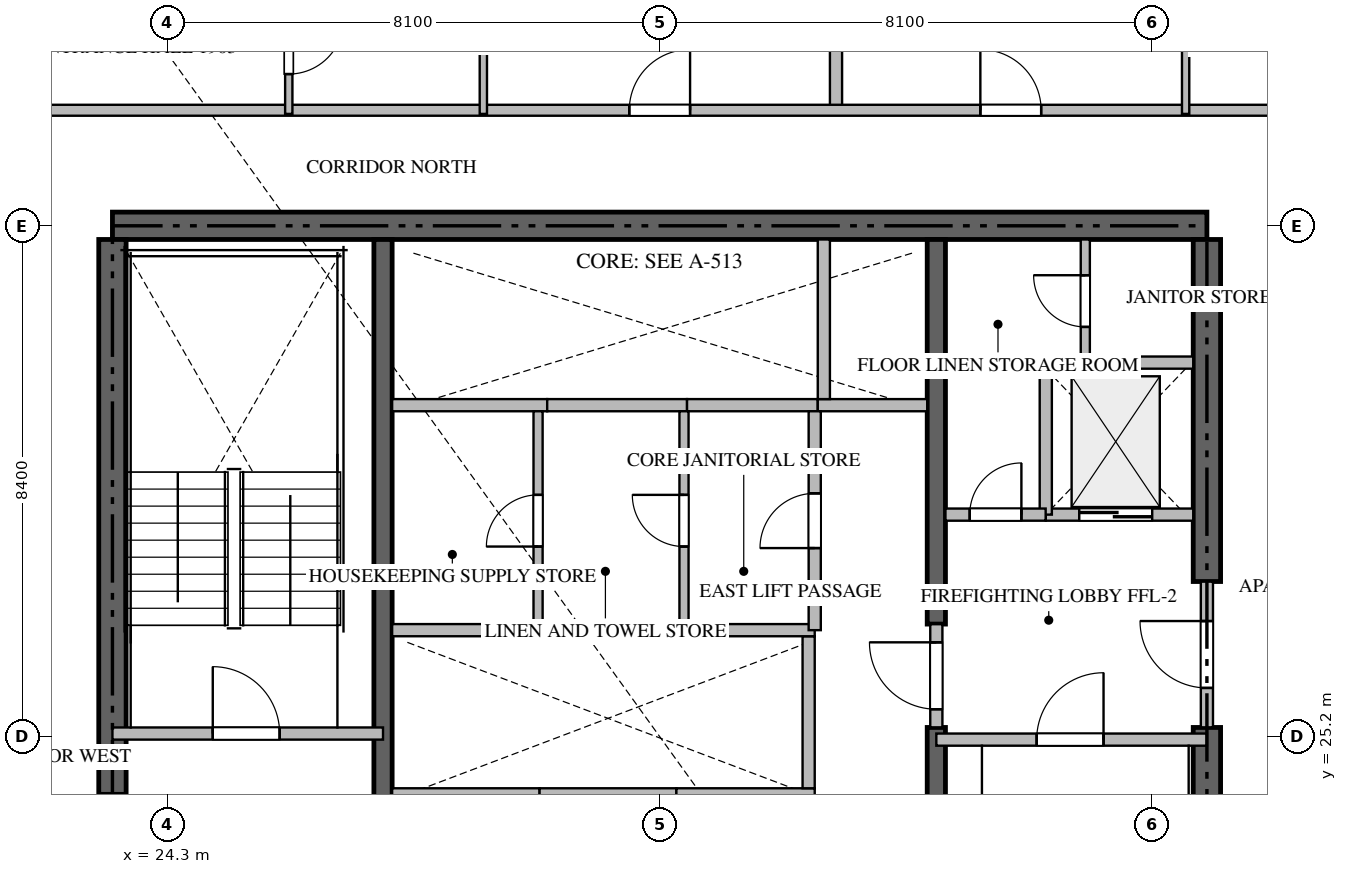
"""IFC4 building model, lengths in metres.
Left out: names, types, materials, properties, quantities, classifications, styles, units other than length and angle.
Written with IfcOpenShell. Run it as: python <this file> out.ifc"""

import sys

from ifc_helpers import new_model, si_unit, direction, frame, frame_2d, origin, place, context, subcontext, project, spatial, rectangle, extrude, source, transform, mapped, element, fill, save


model = new_model("IFC4")
c1 = context("Model", 3, precision=1e-05, world=origin(), true_north=direction((0.0, 1.0)))
c2 = subcontext(c1, "Body", "Model", "MODEL_VIEW")
j1 = project(units=[si_unit("LENGTHUNIT", "METRE"), si_unit("PLANEANGLEUNIT", "RADIAN")], contexts=[c1])
p1 = place(None, origin())
s1 = spatial("IfcSite", under=j1, at=p1, CompositionType="ELEMENT")
p2 = place(p1, origin())
s2 = spatial("IfcBuilding", under=s1, at=p2, CompositionType="ELEMENT")
p3 = place(p2, frame((0.0, 0.0, 79.2)))
s3 = spatial("IfcBuildingStorey", under=s2, at=p3, CompositionType="ELEMENT", Elevation=79.2)
p4 = place(p3, frame((41.4, 33.6, -0.26), z_axis=(0.0, 0.0, 1.0), x_axis=(-1.0, 0.0, 0.0)))
e1 = element("IfcWall", 1, at=p4, inside=s3, PredefinedType="SHEAR", context=c2, shape_type="SweptSolid", body=[
    extrude(rectangle(XDim=18.0, YDim=0.45, at=frame_2d((9.0, 0.0))), origin(), (0.0, 0.0, 1.0), 3.748),
])
p5 = place(p3, frame((23.4, 24.25, -0.26), z_axis=(0.0, 0.0, 1.0), x_axis=(0.0, 1.0, 0.0)))
e2 = element("IfcWall", 2, at=p5, inside=s3, PredefinedType="SHEAR", context=c2, shape_type="SweptSolid", body=[
    extrude(rectangle(XDim=9.125, YDim=0.45, at=frame_2d((4.562, 0.0))), origin(), (0.0, 0.0, 1.0), 3.748),
])
p6 = place(p3, frame((41.4, 17.025, -0.26), z_axis=(0.0, 0.0, 1.0), x_axis=(0.0, 1.0, 0.0)))
e3 = element("IfcWall", 3, at=p6, inside=s3, PredefinedType="SHEAR", context=c2, shape_type="SweptSolid", body=[
    extrude(rectangle(XDim=8.325, YDim=0.45, at=frame_2d((4.163, 0.0))), origin(), (0.0, 0.0, 1.0), 3.748),
])
p7 = place(p3, frame((41.4, 27.75, -0.26), z_axis=(0.0, 0.0, 1.0), x_axis=(0.0, 1.0, 0.0)))
e4 = element("IfcWall", 4, at=p7, inside=s3, PredefinedType="SHEAR", context=c2, shape_type="SweptSolid", body=[
    extrude(rectangle(XDim=5.625, YDim=0.45, at=frame_2d((2.812, 0.0))), origin(), (0.0, 0.0, 1.0), 3.748),
])
p8 = place(p3, frame((27.85, 23.55, -0.26), z_axis=(0.0, 0.0, 1.0), x_axis=(0.0, 1.0, 0.0)))
e5 = element("IfcWall", 5, at=p8, inside=s3, PredefinedType="SHEAR", context=c2, shape_type="SweptSolid", body=[
    extrude(rectangle(XDim=9.825, YDim=0.3, at=frame_2d((4.913, 0.0))), origin(), (0.0, 0.0, 1.0), 3.748),
])
p9 = place(p3, frame((36.95, 17.025, -0.26), z_axis=(0.0, 0.0, 1.0), x_axis=(0.0, 1.0, 0.0)))
e6 = element("IfcWall", 6, at=p9, inside=s3, PredefinedType="SHEAR", context=c2, shape_type="SweptSolid", body=[
    extrude(rectangle(XDim=8.325, YDim=0.3, at=frame_2d((4.163, 0.0))), origin(), (0.0, 0.0, 1.0), 3.748),
])
p10 = place(p3, frame((36.95, 27.05, -0.26), z_axis=(0.0, 0.0, 1.0), x_axis=(0.0, 1.0, 0.0)))
e7 = element("IfcWall", 7, at=p10, inside=s3, PredefinedType="SHEAR", context=c2, shape_type="SweptSolid", body=[
    extrude(rectangle(XDim=6.325, YDim=0.3, at=frame_2d((3.163, 0.0))), origin(), (0.0, 0.0, 1.0), 3.748),
])
p11 = place(p3, frame((23.4, 25.25, 0.0), z_axis=(0.0, 0.0, 1.0), x_axis=(1.0, 0.0, 0.0)))
e8 = element("IfcWall", 8, at=p11, inside=s3, PredefinedType="STANDARD", context=c2, shape_type="SweptSolid", body=[
    extrude(rectangle(XDim=4.45, YDim=0.2, at=frame_2d((2.225, 0.0))), origin(), (0.0, 0.0, 1.0), 3.49),
])
p12 = place(p11, frame((1.65, 0.0, 0.0)))
e9 = element("IfcOpeningElement", 9, at=p12, cuts=e8, PredefinedType="OPENING", context=c2, shape_type="SweptSolid", body=[
    extrude(rectangle(XDim=1.1, YDim=2.15, at=frame_2d((0.55, 1.075))), frame((0.0, 0.11, 0.0), z_axis=(0.0, -1.0, 0.0), x_axis=(1.0, 0.0, 0.0)), (0.0, 0.0, 1.0), 0.22),
])
p13 = place(p3, frame((36.95, 25.15, 0.0), z_axis=(0.0, 0.0, 1.0), x_axis=(1.0, 0.0, 0.0)))
e10 = element("IfcWall", 10, at=p13, inside=s3, PredefinedType="STANDARD", context=c2, shape_type="SweptSolid", body=[
    extrude(rectangle(XDim=4.45, YDim=0.2, at=frame_2d((2.225, 0.0))), origin(), (0.0, 0.0, 1.0), 3.49),
])
p14 = place(p13, frame((1.65, 0.0, 0.0)))
e11 = element("IfcOpeningElement", 11, at=p14, cuts=e10, PredefinedType="OPENING", context=c2, shape_type="SweptSolid", body=[
    extrude(rectangle(XDim=1.1, YDim=2.15, at=frame_2d((0.55, 1.075))), frame((0.0, 0.11, 0.0), z_axis=(0.0, -1.0, 0.0), x_axis=(1.0, 0.0, 0.0)), (0.0, 0.0, 1.0), 0.22),
])
p15 = place(p3, frame((38.75, 28.85, 0.0), z_axis=(0.0, 0.0, 1.0), x_axis=(1.0, 0.0, 0.0)))
e12 = element("IfcWall", 12, at=p15, inside=s3, PredefinedType="STANDARD", context=c2, shape_type="SweptSolid", body=[
    extrude(rectangle(XDim=2.425, YDim=0.2, at=frame_2d((1.212, 0.0))), origin(), (0.0, 0.0, 1.0), 3.49),
])
p16 = place(p15, frame((0.55, 0.0, 0.0)))
e13 = element("IfcOpeningElement", 13, at=p16, cuts=e12, PredefinedType="OPENING", context=c2, shape_type="SweptSolid", body=[
    extrude(rectangle(XDim=1.2, YDim=2.2, at=frame_2d((0.6, 1.1))), frame((0.0, 0.11, 0.0), z_axis=(0.0, -1.0, 0.0), x_axis=(1.0, 0.0, 0.0)), (0.0, 0.0, 1.0), 0.22),
])
p17 = place(p3, frame((28.0, 24.25, 0.0), z_axis=(0.0, 0.0, 1.0), x_axis=(1.0, 0.0, 0.0)))
e14 = element("IfcWall", 14, at=p17, inside=s3, PredefinedType="STANDARD", context=c2, shape_type="SweptSolid", body=[
    extrude(rectangle(XDim=2.425, YDim=0.2, at=frame_2d((1.212, 0.0))), origin(), (0.0, 0.0, 1.0), 3.49),
])
p18 = place(p3, frame((30.425, 24.25, 0.0), z_axis=(0.0, 0.0, 1.0), x_axis=(1.0, 0.0, 0.0)))
e15 = element("IfcWall", 15, at=p18, inside=s3, PredefinedType="STANDARD", context=c2, shape_type="SweptSolid", body=[
    extrude(rectangle(XDim=2.25, YDim=0.2, at=frame_2d((1.125, 0.0))), origin(), (0.0, 0.0, 1.0), 3.49),
])
p19 = place(p3, frame((32.675, 24.25, 0.0), z_axis=(0.0, 0.0, 1.0), x_axis=(1.0, 0.0, 0.0)))
e16 = element("IfcWall", 16, at=p19, inside=s3, PredefinedType="STANDARD", context=c2, shape_type="SweptSolid", body=[
    extrude(rectangle(XDim=2.275, YDim=0.2, at=frame_2d((1.137, 0.0))), origin(), (0.0, 0.0, 1.0), 3.49),
])
p20 = place(p3, frame((34.85, 24.35, 0.0), z_axis=(0.0, 0.0, 1.0), x_axis=(0.0, 1.0, 0.0)))
e17 = element("IfcWall", 17, at=p20, inside=s3, PredefinedType="STANDARD", context=c2, shape_type="SweptSolid", body=[
    extrude(rectangle(XDim=2.5, YDim=0.2, at=frame_2d((1.25, 0.0))), origin(), (0.0, 0.0, 1.0), 3.49),
])
p21 = place(p3, frame((28.0, 30.65, 0.0), z_axis=(0.0, 0.0, 1.0), x_axis=(1.0, 0.0, 0.0)))
e18 = element("IfcWall", 18, at=p21, inside=s3, PredefinedType="STANDARD", context=c2, shape_type="SweptSolid", body=[
    extrude(rectangle(XDim=2.55, YDim=0.2, at=frame_2d((1.275, 0.0))), origin(), (0.0, 0.0, 1.0), 3.49),
])
p22 = place(p3, frame((30.55, 30.65, 0.0), z_axis=(0.0, 0.0, 1.0), x_axis=(1.0, 0.0, 0.0)))
e19 = element("IfcWall", 19, at=p22, inside=s3, PredefinedType="STANDARD", context=c2, shape_type="SweptSolid", body=[
    extrude(rectangle(XDim=2.3, YDim=0.2, at=frame_2d((1.15, 0.0))), origin(), (0.0, 0.0, 1.0), 3.49),
])
p23 = place(p3, frame((32.85, 30.65, 0.0), z_axis=(0.0, 0.0, 1.0), x_axis=(1.0, 0.0, 0.0)))
e20 = element("IfcWall", 20, at=p23, inside=s3, PredefinedType="STANDARD", context=c2, shape_type="SweptSolid", body=[
    extrude(rectangle(XDim=2.15, YDim=0.2, at=frame_2d((1.075, 0.0))), origin(), (0.0, 0.0, 1.0), 3.49),
])
p24 = place(p3, frame((35.0, 30.65, 0.0), z_axis=(0.0, 0.0, 1.0), x_axis=(1.0, 0.0, 0.0)))
e21 = element("IfcWall", 21, at=p24, inside=s3, PredefinedType="STANDARD", context=c2, shape_type="SweptSolid", body=[
    extrude(rectangle(XDim=1.8, YDim=0.2, at=frame_2d((0.9, 0.0))), origin(), (0.0, 0.0, 1.0), 3.49),
])
p25 = place(p3, frame((35.1, 30.75, 0.0), z_axis=(0.0, 0.0, 1.0), x_axis=(0.0, 1.0, 0.0)))
e22 = element("IfcWall", 22, at=p25, inside=s3, PredefinedType="STANDARD", context=c2, shape_type="SweptSolid", body=[
    extrude(rectangle(XDim=2.625, YDim=0.2, at=frame_2d((1.312, 0.0))), origin(), (0.0, 0.0, 1.0), 3.49),
])
p26 = place(p3, frame((38.75, 28.85, 0.0), z_axis=(0.0, 0.0, 1.0), x_axis=(0.0, 1.0, 0.0)))
e23 = element("IfcWall", 23, at=p26, inside=s3, PredefinedType="STANDARD", context=c2, shape_type="SweptSolid", body=[
    extrude(rectangle(XDim=2.5, YDim=0.2, at=frame_2d((1.25, 0.0))), origin(), (0.0, 0.0, 1.0), 3.49),
])
p27 = place(p3, frame((38.75, 31.35, 0.0), z_axis=(0.0, 0.0, 1.0), x_axis=(1.0, 0.0, 0.0)))
e24 = element("IfcWall", 24, at=p27, inside=s3, PredefinedType="STANDARD", context=c2, shape_type="SweptSolid", body=[
    extrude(rectangle(XDim=2.425, YDim=0.2, at=frame_2d((1.212, 0.0))), origin(), (0.0, 0.0, 1.0), 3.49),
])
p28 = place(p3, frame((37.1, 28.85, 0.0), z_axis=(0.0, 0.0, 1.0), x_axis=(1.0, 0.0, 0.0)))
e25 = element("IfcWall", 25, at=p28, inside=s3, PredefinedType="STANDARD", context=c2, shape_type="SweptSolid", body=[
    extrude(rectangle(XDim=1.648, YDim=0.2, at=frame_2d((0.824, 0.0))), origin(), (0.0, 0.0, 1.0), 3.49),
])
p29 = place(p28, frame((0.399, 0.0, 0.0)))
e26 = element("IfcOpeningElement", 26, at=p29, cuts=e25, PredefinedType="OPENING", context=c2, shape_type="SweptSolid", body=[
    extrude(rectangle(XDim=0.85, YDim=2.1, at=frame_2d((0.425, 1.05))), frame((0.0, 0.11, 0.0), z_axis=(0.0, -1.0, 0.0), x_axis=(1.0, 0.0, 0.0)), (0.0, 0.0, 1.0), 0.22),
])
p30 = place(p3, frame((41.4, 25.352, 0.0), z_axis=(0.0, 0.0, 1.0), x_axis=(0.0, 1.0, 0.0)))
e27 = element("IfcWall", 27, at=p30, inside=s3, PredefinedType="STANDARD", context=c2, shape_type="SweptSolid", body=[
    extrude(rectangle(XDim=2.396, YDim=0.2, at=frame_2d((1.198, 0.0))), origin(), (0.0, 0.0, 1.0), 3.49),
])
p31 = place(p30, frame((0.648, 0.0, 0.0)))
e28 = element("IfcOpeningElement", 28, at=p31, cuts=e27, PredefinedType="OPENING", context=c2, shape_type="SweptSolid", body=[
    extrude(rectangle(XDim=1.1, YDim=2.15, at=frame_2d((0.55, 1.075))), frame((0.0, 0.11, 0.0), z_axis=(0.0, -1.0, 0.0), x_axis=(1.0, 0.0, 0.0)), (0.0, 0.0, 1.0), 0.22),
])
p32 = place(p3, frame((36.95, 25.352, 0.0), z_axis=(0.0, 0.0, 1.0), x_axis=(0.0, 1.0, 0.0)))
e29 = element("IfcWall", 29, at=p32, inside=s3, PredefinedType="STANDARD", context=c2, shape_type="SweptSolid", body=[
    extrude(rectangle(XDim=1.696, YDim=0.2, at=frame_2d((0.848, 0.0))), origin(), (0.0, 0.0, 1.0), 3.49),
])
p33 = place(p32, frame((0.298, 0.0, 0.0)))
e30 = element("IfcOpeningElement", 30, at=p33, cuts=e29, PredefinedType="OPENING", context=c2, shape_type="SweptSolid", body=[
    extrude(rectangle(XDim=1.1, YDim=2.15, at=frame_2d((0.55, 1.075))), frame((0.0, 0.11, 0.0), z_axis=(0.0, -1.0, 0.0), x_axis=(1.0, 0.0, 0.0)), (0.0, 0.0, 1.0), 0.22),
])
p34 = place(p3, frame((28.0, 26.95, 0.0), z_axis=(0.0, 0.0, 1.0), x_axis=(1.0, 0.0, 0.0)))
e31 = element("IfcWall", 31, at=p34, inside=s3, PredefinedType="STANDARD", context=c2, shape_type="SweptSolid", body=[
    extrude(rectangle(XDim=6.95, YDim=0.2, at=frame_2d((3.475, 0.0))), origin(), (0.0, 0.0, 1.0), 3.49),
])
p35 = place(p3, frame((39.4, 31.35, 0.0), z_axis=(0.0, 0.0, 1.0), x_axis=(0.0, 1.0, 0.0)))
e32 = element("IfcWall", 32, at=p35, inside=s3, PredefinedType="PARTITIONING", context=c2, shape_type="SweptSolid", body=[
    extrude(rectangle(XDim=2.025, YDim=0.15, at=frame_2d((1.012, 0.0))), origin(), (0.0, 0.0, 1.0), 3.49),
])
p36 = place(p35, frame((0.587, 0.0, 0.0)))
e33 = element("IfcOpeningElement", 33, at=p36, cuts=e32, PredefinedType="OPENING", context=c2, shape_type="SweptSolid", body=[
    extrude(rectangle(XDim=0.85, YDim=2.1, at=frame_2d((0.425, 1.05))), frame((0.0, 0.085, 0.0), z_axis=(0.0, -1.0, 0.0), x_axis=(1.0, 0.0, 0.0)), (0.0, 0.0, 1.0), 0.17),
])
p37 = place(p3, frame((34.95, 26.95, 0.0), z_axis=(0.0, 0.0, 1.0), x_axis=(0.0, 1.0, 0.0)))
e34 = element("IfcWall", 34, at=p37, inside=s3, PredefinedType="STANDARD", context=c2, shape_type="SweptSolid", body=[
    extrude(rectangle(XDim=3.6, YDim=0.2, at=frame_2d((1.8, 0.0))), origin(), (0.0, 0.0, 1.0), 3.49),
])
p38 = place(p37, frame((1.35, 0.0, 0.0)))
e35 = element("IfcOpeningElement", 35, at=p38, cuts=e34, PredefinedType="OPENING", context=c2, shape_type="SweptSolid", body=[
    extrude(rectangle(XDim=0.9, YDim=2.1, at=frame_2d((0.45, 1.05))), frame((0.0, 0.11, 0.0), z_axis=(0.0, -1.0, 0.0), x_axis=(1.0, 0.0, 0.0)), (0.0, 0.0, 1.0), 0.22),
])
p39 = place(p3, frame((32.8, 26.95, 0.0), z_axis=(0.0, 0.0, 1.0), x_axis=(0.0, 1.0, 0.0)))
e36 = element("IfcWall", 36, at=p39, inside=s3, PredefinedType="PARTITIONING", context=c2, shape_type="SweptSolid", body=[
    extrude(rectangle(XDim=3.6, YDim=0.15, at=frame_2d((1.8, 0.0))), origin(), (0.0, 0.0, 1.0), 3.49),
])
p40 = place(p39, frame((1.375, 0.0, 0.0)))
e37 = element("IfcOpeningElement", 37, at=p40, cuts=e36, PredefinedType="OPENING", context=c2, shape_type="SweptSolid", body=[
    extrude(rectangle(XDim=0.85, YDim=2.1, at=frame_2d((0.425, 1.05))), frame((0.0, 0.085, 0.0), z_axis=(0.0, -1.0, 0.0), x_axis=(1.0, 0.0, 0.0)), (0.0, 0.0, 1.0), 0.17),
])
p41 = place(p3, frame((30.4, 26.95, 0.0), z_axis=(0.0, 0.0, 1.0), x_axis=(0.0, 1.0, 0.0)))
e38 = element("IfcWall", 38, at=p41, inside=s3, PredefinedType="PARTITIONING", context=c2, shape_type="SweptSolid", body=[
    extrude(rectangle(XDim=3.6, YDim=0.15, at=frame_2d((1.8, 0.0))), origin(), (0.0, 0.0, 1.0), 3.49),
])
p42 = place(p41, frame((1.375, 0.0, 0.0)))
e39 = element("IfcOpeningElement", 39, at=p42, cuts=e38, PredefinedType="OPENING", context=c2, shape_type="SweptSolid", body=[
    extrude(rectangle(XDim=0.85, YDim=2.1, at=frame_2d((0.425, 1.05))), frame((0.0, 0.085, 0.0), z_axis=(0.0, -1.0, 0.0), x_axis=(1.0, 0.0, 0.0)), (0.0, 0.0, 1.0), 0.17),
])
p43 = place(p3, frame((35.3, 35.5, 0.0), z_axis=(0.0, 0.0, 1.0), x_axis=(0.0, 1.0, 0.0)))
e40 = element("IfcWall", 40, at=p43, inside=s3, PredefinedType="PARTITIONING", context=c2, shape_type="SweptSolid", body=[
    extrude(rectangle(XDim=14.618, YDim=0.2, at=frame_2d((7.309, 0.0))), origin(), (0.0, 0.0, 1.0), 3.49),
])
p44 = place(p3, frame((21.402, 35.5, 0.0), z_axis=(0.0, 0.0, 1.0), x_axis=(1.0, 0.0, 0.0)))
e41 = element("IfcWall", 41, at=p44, inside=s3, PredefinedType="PARTITIONING", context=c2, shape_type="SweptSolid", body=[
    extrude(rectangle(XDim=21.996, YDim=0.18, at=frame_2d((10.998, 0.0))), origin(), (0.0, 0.0, 1.0), 3.49),
])
p45 = place(p44, frame((10.498, 0.0, 0.0)))
e42 = element("IfcOpeningElement", 42, at=p45, cuts=e41, PredefinedType="OPENING", context=c2, shape_type="SweptSolid", body=[
    extrude(rectangle(XDim=1.0, YDim=2.15, at=frame_2d((0.5, 1.075))), frame((0.0, 0.1, 0.0), z_axis=(0.0, -1.0, 0.0), x_axis=(1.0, 0.0, 0.0)), (0.0, 0.0, 1.0), 0.2),
])
p46 = place(p44, frame((16.272, 0.0, 0.0)))
e43 = element("IfcOpeningElement", 43, at=p46, cuts=e41, PredefinedType="OPENING", context=c2, shape_type="SweptSolid", body=[
    extrude(rectangle(XDim=1.0, YDim=2.15, at=frame_2d((0.5, 1.075))), frame((0.0, 0.1, 0.0), z_axis=(0.0, -1.0, 0.0), x_axis=(1.0, 0.0, 0.0)), (0.0, 0.0, 1.0), 0.2),
])
p47 = place(p3, frame((29.5, 38.25, 0.0), z_axis=(0.0, 0.0, 1.0), x_axis=(0.0, -1.0, 0.0)))
e44 = element("IfcWall", 44, at=p47, inside=s3, PredefinedType="PARTITIONING", context=c2, shape_type="SweptSolid", body=[
    extrude(rectangle(XDim=2.81, YDim=0.12, at=frame_2d((1.405, 0.0))), origin(), (0.0, 0.0, 1.0), 3.49),
])
p48 = place(p3, frame((26.3, 37.65, 0.0), z_axis=(0.0, 0.0, 1.0), x_axis=(0.0, -1.0, 0.0)))
e45 = element("IfcWall", 45, at=p48, inside=s3, PredefinedType="PARTITIONING", context=c2, shape_type="SweptSolid", body=[
    extrude(rectangle(XDim=2.21, YDim=0.12, at=frame_2d((1.105, 0.0))), origin(), (0.0, 0.0, 1.0), 3.49),
])
p49 = place(p48, frame((0.655, 0.0, 0.0)))
e46 = element("IfcOpeningElement", 46, at=p49, cuts=e45, PredefinedType="OPENING", context=c2, shape_type="SweptSolid", body=[
    extrude(rectangle(XDim=0.9, YDim=2.1, at=frame_2d((0.45, 1.05))), frame((0.0, 0.07, 0.0), z_axis=(0.0, -1.0, 0.0), x_axis=(1.0, 0.0, 0.0)), (0.0, 0.0, 1.0), 0.14),
])
p50 = place(p3, frame((41.05, 38.25, 0.0), z_axis=(0.0, 0.0, 1.0), x_axis=(0.0, -1.0, 0.0)))
e47 = element("IfcWall", 47, at=p50, inside=s3, PredefinedType="PARTITIONING", context=c2, shape_type="SweptSolid", body=[
    extrude(rectangle(XDim=2.81, YDim=0.12, at=frame_2d((1.405, 0.0))), origin(), (0.0, 0.0, 1.0), 3.49),
])
m1 = source(origin(), c2, "Body", "SweptSolid", [
    extrude(rectangle(XDim=1.1, YDim=2.15, at=frame_2d((0.55, 1.075))), frame((0.0, 0.025, 0.0), z_axis=(0.0, -1.0, 0.0), x_axis=(1.0, 0.0, 0.0)), (0.0, 0.0, 1.0), 0.05),
])
p51 = place(p12, origin())
e48 = element("IfcDoor", 48, at=p51, inside=s3, OperationType="SINGLE_SWING_LEFT", PredefinedType="DOOR", context=c2, shape_type="MappedRepresentation", body=[
    mapped(m1, transform((0.0, 0.0, 0.0), scale=1.0)),
])
fill(e9, e48)
p52 = place(p14, origin())
e49 = element("IfcDoor", 49, at=p52, inside=s3, OperationType="SINGLE_SWING_RIGHT", PredefinedType="DOOR", context=c2, shape_type="MappedRepresentation", body=[
    mapped(m1, transform((0.0, 0.0, 0.0), scale=1.0)),
])
fill(e11, e49)
m2 = source(origin(), c2, "Body", "SweptSolid", [
    extrude(rectangle(XDim=1.2, YDim=2.2, at=frame_2d((0.6, 1.1))), frame((0.0, 0.025, 0.0), z_axis=(0.0, -1.0, 0.0), x_axis=(1.0, 0.0, 0.0)), (0.0, 0.0, 1.0), 0.05),
])
p53 = place(p16, origin())
e50 = element("IfcDoor", 50, at=p53, inside=s3, OperationType="DOUBLE_DOOR_SLIDING", PredefinedType="DOOR", context=c2, shape_type="MappedRepresentation", body=[
    mapped(m2, transform((0.0, 0.0, 0.0), scale=1.0)),
])
fill(e13, e50)
m3 = source(origin(), c2, "Body", "SweptSolid", [
    extrude(rectangle(XDim=0.85, YDim=2.1, at=frame_2d((0.425, 1.05))), frame((0.0, 0.025, 0.0), z_axis=(0.0, -1.0, 0.0), x_axis=(1.0, 0.0, 0.0)), (0.0, 0.0, 1.0), 0.05),
])
p54 = place(p29, origin())
e51 = element("IfcDoor", 51, at=p54, inside=s3, OperationType="SINGLE_SWING_RIGHT", PredefinedType="DOOR", context=c2, shape_type="MappedRepresentation", body=[
    mapped(m3, transform((0.0, 0.0, 0.0), scale=1.0)),
])
fill(e26, e51)
p55 = place(p31, origin())
e52 = element("IfcDoor", 52, at=p55, inside=s3, OperationType="SINGLE_SWING_RIGHT", PredefinedType="DOOR", context=c2, shape_type="MappedRepresentation", body=[
    mapped(m1, transform((0.0, 0.0, 0.0), scale=1.0)),
])
fill(e28, e52)
p56 = place(p33, origin())
e53 = element("IfcDoor", 53, at=p56, inside=s3, OperationType="SINGLE_SWING_RIGHT", PredefinedType="DOOR", context=c2, shape_type="MappedRepresentation", body=[
    mapped(m1, transform((0.0, 0.0, 0.0), scale=1.0)),
])
fill(e30, e53)
p57 = place(p36, origin())
e54 = element("IfcDoor", 54, at=p57, inside=s3, OperationType="SINGLE_SWING_RIGHT", PredefinedType="DOOR", context=c2, shape_type="MappedRepresentation", body=[
    mapped(m3, transform((0.0, 0.0, 0.0), scale=1.0)),
])
fill(e33, e54)
m4 = source(origin(), c2, "Body", "SweptSolid", [
    extrude(rectangle(XDim=0.9, YDim=2.1, at=frame_2d((0.45, 1.05))), frame((0.0, 0.025, 0.0), z_axis=(0.0, -1.0, 0.0), x_axis=(1.0, 0.0, 0.0)), (0.0, 0.0, 1.0), 0.05),
])
p58 = place(p38, origin())
e55 = element("IfcDoor", 55, at=p58, inside=s3, OperationType="SINGLE_SWING_LEFT", PredefinedType="DOOR", context=c2, shape_type="MappedRepresentation", body=[
    mapped(m4, transform((0.0, 0.0, 0.0), scale=1.0)),
])
fill(e35, e55)
p59 = place(p40, origin())
e56 = element("IfcDoor", 56, at=p59, inside=s3, OperationType="SINGLE_SWING_RIGHT", PredefinedType="DOOR", context=c2, shape_type="MappedRepresentation", body=[
    mapped(m3, transform((0.0, 0.0, 0.0), scale=1.0)),
])
fill(e37, e56)
p60 = place(p42, origin())
e57 = element("IfcDoor", 57, at=p60, inside=s3, OperationType="SINGLE_SWING_LEFT", PredefinedType="DOOR", context=c2, shape_type="MappedRepresentation", body=[
    mapped(m3, transform((0.0, 0.0, 0.0), scale=1.0)),
])
fill(e39, e57)
m5 = source(origin(), c2, "Body", "SweptSolid", [
    extrude(rectangle(XDim=1.0, YDim=2.15, at=frame_2d((0.5, 1.075))), frame((0.0, 0.025, 0.0), z_axis=(0.0, -1.0, 0.0), x_axis=(1.0, 0.0, 0.0)), (0.0, 0.0, 1.0), 0.05),
])
p61 = place(p45, origin())
e58 = element("IfcDoor", 58, at=p61, inside=s3, OperationType="SINGLE_SWING_RIGHT", PredefinedType="DOOR", context=c2, shape_type="MappedRepresentation", body=[
    mapped(m5, transform((0.0, 0.0, 0.0), scale=1.0)),
])
fill(e42, e58)
p62 = place(p46, origin())
e59 = element("IfcDoor", 59, at=p62, inside=s3, OperationType="SINGLE_SWING_LEFT", PredefinedType="DOOR", context=c2, shape_type="MappedRepresentation", body=[
    mapped(m5, transform((0.0, 0.0, 0.0), scale=1.0)),
])
fill(e43, e59)
p63 = place(p49, origin())
e60 = element("IfcDoor", 60, at=p63, inside=s3, OperationType="SINGLE_SWING_LEFT", PredefinedType="DOOR", context=c2, shape_type="MappedRepresentation", body=[
    mapped(m4, transform((0.0, 0.0, 0.0), scale=1.0)),
])
fill(e46, e60)
save(model, sys.argv[1])
